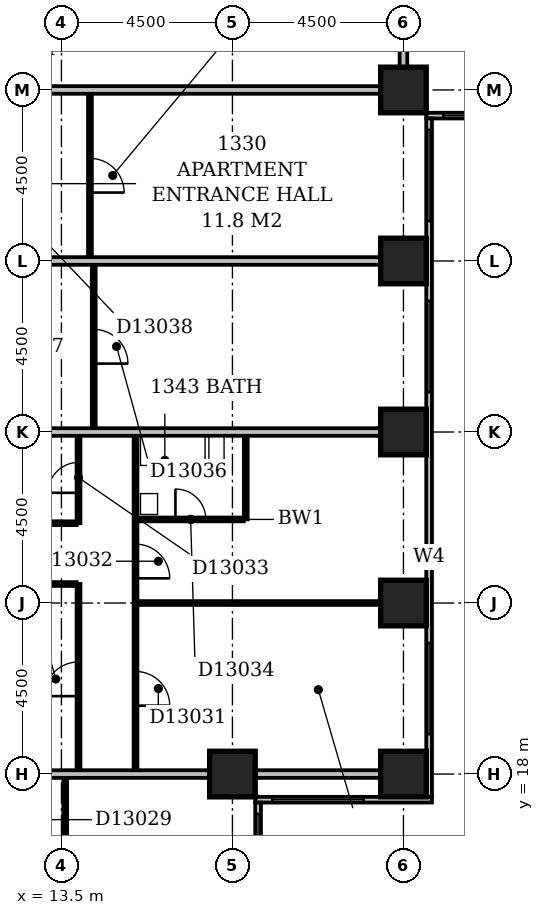
"""IFC4 building model, lengths in metres.
Left out: names, types, materials, properties, quantities, classifications, styles, units other than length and angle.
Written with IfcOpenShell. Run it as: python <this file> out.ifc"""

import sys

from ifc_helpers import new_model, si_unit, direction, frame, frame_2d, origin, origin_2d, place, context, subcontext, project, spatial, rectangle, extrude, element, fill, save


model = new_model("IFC4")
c1 = context("Model", 3, precision=1e-05, world=origin(), true_north=direction((0.0, 1.0)))
c2 = subcontext(c1, "Body", "Model", "MODEL_VIEW")
j1 = project(units=[si_unit("LENGTHUNIT", "METRE"), si_unit("PLANEANGLEUNIT", "RADIAN")], contexts=[c1])
p1 = place(None, origin())
s1 = spatial("IfcSite", under=j1, at=p1, CompositionType="ELEMENT")
p2 = place(p1, origin())
s2 = spatial("IfcBuilding", under=s1, at=p2, CompositionType="ELEMENT")
p3 = place(p2, frame((0.0, 0.0, 57.8)))
s3 = spatial("IfcBuildingStorey", under=s2, at=p3, CompositionType="ELEMENT", Elevation=57.8)
for number, where, z_axis, x_axis in (
    (1, (18.0, 18.0, -0.3), (0.0, 0.0, 1.0), (1.0, 0.0, 0.0)),
    (2, (22.5, 18.0, -0.3), (0.0, 0.0, 1.0), (1.0, 0.0, 0.0)),
    (3, (22.5, 22.5, -0.3), (0.0, 0.0, 1.0), (1.0, 0.0, 0.0)),
    (4, (22.5, 27.0, -0.3), (0.0, 0.0, 1.0), (1.0, 0.0, 0.0)),
    (5, (22.5, 31.5, -0.3), (0.0, 0.0, 1.0), (1.0, 0.0, 0.0)),
    (6, (22.5, 36.0, -0.3), (0.0, 0.0, 1.0), (1.0, 0.0, 0.0)),
):
    element("IfcColumn", number, at=place(p3, frame(where, z_axis=z_axis, x_axis=x_axis)), inside=s3, PredefinedType="COLUMN", context=c2, shape_type="SweptSolid", body=[
        extrude(rectangle(XDim=1.2, YDim=1.2, at=origin_2d()), origin(), (0.0, 0.0, 1.0), 3.6),
    ])
p4 = place(p3, frame((18.675, 8.4, 0.0), z_axis=(0.0, 0.0, 1.0), x_axis=(0.0, 1.0, 0.0)))
e7 = element("IfcWall", 7, at=p4, inside=s3, PredefinedType="STANDARD", context=c2, shape_type="SweptSolid", body=[
    extrude(rectangle(XDim=8.85, YDim=0.15, at=frame_2d((4.425, 0.0))), origin(), (0.0, 0.0, 1.0), 2.7),
])
p5 = place(p4, frame((1.447, 0.0, 0.6)))
e8 = element("IfcOpeningElement", 8, at=p5, cuts=e7, PredefinedType="OPENING", context=c2, shape_type="SweptSolid", body=[
    extrude(rectangle(XDim=1.8, YDim=1.8, at=frame_2d((0.9, 0.9))), frame((0.0, 0.087, 0.0), z_axis=(0.0, -1.0, 0.0), x_axis=(1.0, 0.0, 0.0)), (0.0, 0.0, 1.0), 0.174),
])
p6 = place(p4, frame((6.15, 0.0, 0.6)))
e9 = element("IfcOpeningElement", 9, at=p6, cuts=e7, PredefinedType="OPENING", context=c2, shape_type="SweptSolid", body=[
    extrude(rectangle(XDim=2.4, YDim=1.8, at=frame_2d((1.2, 0.9))), frame((0.0, 0.087, 0.0), z_axis=(0.0, -1.0, 0.0), x_axis=(1.0, 0.0, 0.0)), (0.0, 0.0, 1.0), 0.174),
])
p7 = place(p3, frame((18.6, 17.325, 0.0), z_axis=(0.0, 0.0, 1.0), x_axis=(1.0, 0.0, 0.0)))
e10 = element("IfcWall", 10, at=p7, inside=s3, PredefinedType="STANDARD", context=c2, shape_type="SweptSolid", body=[
    extrude(rectangle(XDim=4.65, YDim=0.15, at=frame_2d((2.325, 0.0))), origin(), (0.0, 0.0, 1.0), 2.7),
])
p8 = place(p7, frame((0.45, 0.0, 0.6)))
e11 = element("IfcOpeningElement", 11, at=p8, cuts=e10, PredefinedType="OPENING", context=c2, shape_type="SweptSolid", body=[
    extrude(rectangle(XDim=2.4, YDim=1.8, at=frame_2d((1.2, 0.9))), frame((0.0, 0.087, 0.0), z_axis=(0.0, -1.0, 0.0), x_axis=(1.0, 0.0, 0.0)), (0.0, 0.0, 1.0), 0.174),
])
p9 = place(p3, frame((23.175, 17.4, 0.0), z_axis=(0.0, 0.0, 1.0), x_axis=(0.0, 1.0, 0.0)))
e12 = element("IfcWall", 12, at=p9, inside=s3, PredefinedType="STANDARD", context=c2, shape_type="SweptSolid", body=[
    extrude(rectangle(XDim=17.85, YDim=0.15, at=frame_2d((8.925, 0.0))), origin(), (0.0, 0.0, 1.0), 2.7),
])
p10 = place(p9, frame((1.65, 0.0, 0.6)))
e13 = element("IfcOpeningElement", 13, at=p10, cuts=e12, PredefinedType="OPENING", context=c2, shape_type="SweptSolid", body=[
    extrude(rectangle(XDim=2.4, YDim=1.8, at=frame_2d((1.2, 0.9))), frame((0.0, 0.087, 0.0), z_axis=(0.0, -1.0, 0.0), x_axis=(1.0, 0.0, 0.0)), (0.0, 0.0, 1.0), 0.174),
])
p11 = place(p9, frame((6.006, 0.0, 0.6)))
e14 = element("IfcOpeningElement", 14, at=p11, cuts=e12, PredefinedType="OPENING", context=c2, shape_type="SweptSolid", body=[
    extrude(rectangle(XDim=0.6, YDim=1.8, at=frame_2d((0.3, 0.9))), frame((0.0, 0.087, 0.0), z_axis=(0.0, -1.0, 0.0), x_axis=(1.0, 0.0, 0.0)), (0.0, 0.0, 1.0), 0.174),
])
p12 = place(p9, frame((10.65, 0.0, 0.6)))
e15 = element("IfcOpeningElement", 15, at=p12, cuts=e12, PredefinedType="OPENING", context=c2, shape_type="SweptSolid", body=[
    extrude(rectangle(XDim=2.4, YDim=1.8, at=frame_2d((1.2, 0.9))), frame((0.0, 0.087, 0.0), z_axis=(0.0, -1.0, 0.0), x_axis=(1.0, 0.0, 0.0)), (0.0, 0.0, 1.0), 0.174),
])
p13 = place(p9, frame((15.15, 0.0, 0.6)))
e16 = element("IfcOpeningElement", 16, at=p13, cuts=e12, PredefinedType="OPENING", context=c2, shape_type="SweptSolid", body=[
    extrude(rectangle(XDim=2.4, YDim=1.8, at=frame_2d((1.2, 0.9))), frame((0.0, 0.087, 0.0), z_axis=(0.0, -1.0, 0.0), x_axis=(1.0, 0.0, 0.0)), (0.0, 0.0, 1.0), 0.174),
])
p14 = place(p3, frame((23.1, 35.325, 0.0), z_axis=(0.0, 0.0, 1.0), x_axis=(1.0, 0.0, 0.0)))
e17 = element("IfcWall", 17, at=p14, inside=s3, PredefinedType="STANDARD", context=c2, shape_type="SweptSolid", body=[
    extrude(rectangle(XDim=45.15, YDim=0.15, at=frame_2d((22.575, 0.0))), origin(), (0.0, 0.0, 1.0), 2.7),
])
p15 = place(p14, frame((0.45, 0.0, 0.6)))
e18 = element("IfcOpeningElement", 18, at=p15, cuts=e17, PredefinedType="OPENING", context=c2, shape_type="SweptSolid", body=[
    extrude(rectangle(XDim=2.4, YDim=1.8, at=frame_2d((1.2, 0.9))), frame((0.0, 0.087, 0.0), z_axis=(0.0, -1.0, 0.0), x_axis=(1.0, 0.0, 0.0)), (0.0, 0.0, 1.0), 0.174),
])
p16 = place(p14, frame((6.854, 0.0, 0.6)))
e19 = element("IfcOpeningElement", 19, at=p16, cuts=e17, PredefinedType="OPENING", context=c2, shape_type="SweptSolid", body=[
    extrude(rectangle(XDim=0.6, YDim=1.8, at=frame_2d((0.3, 0.9))), frame((0.0, 0.087, 0.0), z_axis=(0.0, -1.0, 0.0), x_axis=(1.0, 0.0, 0.0)), (0.0, 0.0, 1.0), 0.174),
])
p17 = place(p14, frame((9.45, 0.0, 0.6)))
e20 = element("IfcOpeningElement", 20, at=p17, cuts=e17, PredefinedType="OPENING", context=c2, shape_type="SweptSolid", body=[
    extrude(rectangle(XDim=2.4, YDim=1.8, at=frame_2d((1.2, 0.9))), frame((0.0, 0.087, 0.0), z_axis=(0.0, -1.0, 0.0), x_axis=(1.0, 0.0, 0.0)), (0.0, 0.0, 1.0), 0.174),
])
p18 = place(p14, frame((13.95, 0.0, 0.6)))
e21 = element("IfcOpeningElement", 21, at=p18, cuts=e17, PredefinedType="OPENING", context=c2, shape_type="SweptSolid", body=[
    extrude(rectangle(XDim=2.4, YDim=1.8, at=frame_2d((1.2, 0.9))), frame((0.0, 0.087, 0.0), z_axis=(0.0, -1.0, 0.0), x_axis=(1.0, 0.0, 0.0)), (0.0, 0.0, 1.0), 0.174),
])
p19 = place(p14, frame((18.323, 0.0, 0.6)))
e22 = element("IfcOpeningElement", 22, at=p19, cuts=e17, PredefinedType="OPENING", context=c2, shape_type="SweptSolid", body=[
    extrude(rectangle(XDim=1.2, YDim=1.8, at=frame_2d((0.6, 0.9))), frame((0.0, 0.087, 0.0), z_axis=(0.0, -1.0, 0.0), x_axis=(1.0, 0.0, 0.0)), (0.0, 0.0, 1.0), 0.174),
])
p20 = place(p14, frame((22.95, 0.0, 0.6)))
e23 = element("IfcOpeningElement", 23, at=p20, cuts=e17, PredefinedType="OPENING", context=c2, shape_type="SweptSolid", body=[
    extrude(rectangle(XDim=2.4, YDim=1.8, at=frame_2d((1.2, 0.9))), frame((0.0, 0.087, 0.0), z_axis=(0.0, -1.0, 0.0), x_axis=(1.0, 0.0, 0.0)), (0.0, 0.0, 1.0), 0.174),
])
p21 = place(p14, frame((27.45, 0.0, 0.6)))
e24 = element("IfcOpeningElement", 24, at=p21, cuts=e17, PredefinedType="OPENING", context=c2, shape_type="SweptSolid", body=[
    extrude(rectangle(XDim=2.4, YDim=1.8, at=frame_2d((1.2, 0.9))), frame((0.0, 0.087, 0.0), z_axis=(0.0, -1.0, 0.0), x_axis=(1.0, 0.0, 0.0)), (0.0, 0.0, 1.0), 0.174),
])
p22 = place(p14, frame((31.706, 0.0, 0.6)))
e25 = element("IfcOpeningElement", 25, at=p22, cuts=e17, PredefinedType="OPENING", context=c2, shape_type="SweptSolid", body=[
    extrude(rectangle(XDim=1.2, YDim=1.8, at=frame_2d((0.6, 0.9))), frame((0.0, 0.087, 0.0), z_axis=(0.0, -1.0, 0.0), x_axis=(1.0, 0.0, 0.0)), (0.0, 0.0, 1.0), 0.174),
])
p23 = place(p14, frame((36.45, 0.0, 0.6)))
e26 = element("IfcOpeningElement", 26, at=p23, cuts=e17, PredefinedType="OPENING", context=c2, shape_type="SweptSolid", body=[
    extrude(rectangle(XDim=2.4, YDim=1.8, at=frame_2d((1.2, 0.9))), frame((0.0, 0.087, 0.0), z_axis=(0.0, -1.0, 0.0), x_axis=(1.0, 0.0, 0.0)), (0.0, 0.0, 1.0), 0.174),
])
p24 = place(p14, frame((40.95, 0.0, 0.6)))
e27 = element("IfcOpeningElement", 27, at=p24, cuts=e17, PredefinedType="OPENING", context=c2, shape_type="SweptSolid", body=[
    extrude(rectangle(XDim=2.4, YDim=1.8, at=frame_2d((1.2, 0.9))), frame((0.0, 0.087, 0.0), z_axis=(0.0, -1.0, 0.0), x_axis=(1.0, 0.0, 0.0)), (0.0, 0.0, 1.0), 0.174),
])
p25 = place(p3, frame((13.6, 9.6, 0.0), z_axis=(0.0, 0.0, 1.0), x_axis=(0.0, 1.0, 0.0)))
e28 = element("IfcWall", 28, at=p25, inside=s3, PredefinedType="PARTITIONING", context=c2, shape_type="SweptSolid", body=[
    extrude(rectangle(XDim=8.3, YDim=0.1, at=frame_2d((4.15, 0.0))), origin(), (0.0, 0.0, 1.0), 3.3),
])
p26 = place(p25, frame((1.2, 0.0, 0.0)))
e29 = element("IfcOpeningElement", 29, at=p26, cuts=e28, PredefinedType="OPENING", context=c2, shape_type="SweptSolid", body=[
    extrude(rectangle(XDim=0.9, YDim=2.1, at=frame_2d((0.45, 1.05))), frame((0.0, 0.062, 0.0), z_axis=(0.0, -1.0, 0.0), x_axis=(1.0, 0.0, 0.0)), (0.0, 0.0, 1.0), 0.124),
])
p27 = place(p25, frame((5.7, 0.0, 0.0)))
e30 = element("IfcOpeningElement", 30, at=p27, cuts=e28, PredefinedType="OPENING", context=c2, shape_type="SweptSolid", body=[
    extrude(rectangle(XDim=0.9, YDim=2.1, at=frame_2d((0.45, 1.05))), frame((0.0, 0.062, 0.0), z_axis=(0.0, -1.0, 0.0), x_axis=(1.0, 0.0, 0.0)), (0.0, 0.0, 1.0), 0.124),
])
p28 = place(p3, frame((9.1, 18.0, 0.0), z_axis=(0.0, 0.0, 1.0), x_axis=(1.0, 0.0, 0.0)))
e31 = element("IfcWall", 31, at=p28, inside=s3, PredefinedType="PARTITIONING", context=c2, shape_type="SweptSolid", body=[
    extrude(rectangle(XDim=8.3, YDim=0.2, at=frame_2d((4.15, 0.0))), origin(), (0.0, 0.0, 1.0), 2.6),
])
p29 = place(p3, frame((18.6, 18.0, 0.0), z_axis=(0.0, 0.0, 1.0), x_axis=(1.0, 0.0, 0.0)))
e32 = element("IfcWall", 32, at=p29, inside=s3, PredefinedType="PARTITIONING", context=c2, shape_type="SweptSolid", body=[
    extrude(rectangle(XDim=3.3, YDim=0.2, at=frame_2d((1.65, 0.0))), origin(), (0.0, 0.0, 1.0), 2.7),
])
p30 = place(p3, frame((13.95, 18.1, 0.0), z_axis=(0.0, 0.0, 1.0), x_axis=(0.0, 1.0, 0.0)))
e33 = element("IfcWall", 33, at=p30, inside=s3, PredefinedType="PARTITIONING", context=c2, shape_type="SweptSolid", body=[
    extrude(rectangle(XDim=4.9, YDim=0.1, at=frame_2d((2.45, 0.0))), origin(), (0.0, 0.0, 1.0), 3.3),
])
p31 = place(p30, frame((1.95, 0.0, 0.0)))
e34 = element("IfcOpeningElement", 34, at=p31, cuts=e33, PredefinedType="OPENING", context=c2, shape_type="SweptSolid", body=[
    extrude(rectangle(XDim=0.9, YDim=2.1, at=frame_2d((0.45, 1.05))), frame((0.0, 0.062, 0.0), z_axis=(0.0, -1.0, 0.0), x_axis=(1.0, 0.0, 0.0)), (0.0, 0.0, 1.0), 0.124),
])
p32 = place(p3, frame((15.45, 18.1, 0.0), z_axis=(0.0, 0.0, 1.0), x_axis=(0.0, 1.0, 0.0)))
e35 = element("IfcWall", 35, at=p32, inside=s3, PredefinedType="PARTITIONING", context=c2, shape_type="SweptSolid", body=[
    extrude(rectangle(XDim=8.8, YDim=0.1, at=frame_2d((4.4, 0.0))), origin(), (0.0, 0.0, 1.0), 3.3),
])
p33 = place(p32, frame((1.7, 0.0, 0.0)))
e36 = element("IfcOpeningElement", 36, at=p33, cuts=e35, PredefinedType="OPENING", context=c2, shape_type="SweptSolid", body=[
    extrude(rectangle(XDim=0.9, YDim=2.1, at=frame_2d((0.45, 1.05))), frame((0.0, 0.062, 0.0), z_axis=(0.0, -1.0, 0.0), x_axis=(1.0, 0.0, 0.0)), (0.0, 0.0, 1.0), 0.124),
])
p34 = place(p32, frame((5.05, 0.0, 0.0)))
e37 = element("IfcOpeningElement", 37, at=p34, cuts=e35, PredefinedType="OPENING", context=c2, shape_type="SweptSolid", body=[
    extrude(rectangle(XDim=0.9, YDim=2.1, at=frame_2d((0.45, 1.05))), frame((0.0, 0.062, 0.0), z_axis=(0.0, -1.0, 0.0), x_axis=(1.0, 0.0, 0.0)), (0.0, 0.0, 1.0), 0.124),
])
p35 = place(p3, frame((15.5, 22.5, 0.0), z_axis=(0.0, 0.0, 1.0), x_axis=(1.0, 0.0, 0.0)))
e38 = element("IfcWall", 38, at=p35, inside=s3, PredefinedType="PARTITIONING", context=c2, shape_type="SweptSolid", body=[
    extrude(rectangle(XDim=6.4, YDim=0.1, at=frame_2d((3.2, 0.0))), origin(), (0.0, 0.0, 1.0), 3.3),
])
p36 = place(p3, frame((9.1, 23.0, 0.0), z_axis=(0.0, 0.0, 1.0), x_axis=(1.0, 0.0, 0.0)))
e39 = element("IfcWall", 39, at=p36, inside=s3, PredefinedType="PARTITIONING", context=c2, shape_type="SweptSolid", body=[
    extrude(rectangle(XDim=4.8, YDim=0.1, at=frame_2d((2.4, 0.0))), origin(), (0.0, 0.0, 1.0), 3.3),
])
p37 = place(p3, frame((9.1, 24.6, 0.0), z_axis=(0.0, 0.0, 1.0), x_axis=(1.0, 0.0, 0.0)))
e40 = element("IfcWall", 40, at=p37, inside=s3, PredefinedType="PLUMBINGWALL", context=c2, shape_type="SweptSolid", body=[
    extrude(rectangle(XDim=4.8, YDim=0.1, at=frame_2d((2.4, 0.0))), origin(), (0.0, 0.0, 1.0), 3.3),
])
p38 = place(p3, frame((13.95, 24.6, 0.0), z_axis=(0.0, 0.0, 1.0), x_axis=(0.0, 1.0, 0.0)))
e41 = element("IfcWall", 41, at=p38, inside=s3, PredefinedType="PARTITIONING", context=c2, shape_type="SweptSolid", body=[
    extrude(rectangle(XDim=2.3, YDim=0.1, at=frame_2d((1.15, 0.0))), origin(), (0.0, 0.0, 1.0), 3.3),
])
p39 = place(p38, frame((0.8, 0.0, 0.0)))
e42 = element("IfcOpeningElement", 42, at=p39, cuts=e41, PredefinedType="OPENING", context=c2, shape_type="SweptSolid", body=[
    extrude(rectangle(XDim=0.8, YDim=2.1, at=frame_2d((0.4, 1.05))), frame((0.0, 0.062, 0.0), z_axis=(0.0, -1.0, 0.0), x_axis=(1.0, 0.0, 0.0)), (0.0, 0.0, 1.0), 0.124),
])
p40 = place(p3, frame((15.5, 24.7, 0.0), z_axis=(0.0, 0.0, 1.0), x_axis=(1.0, 0.0, 0.0)))
e43 = element("IfcWall", 43, at=p40, inside=s3, PredefinedType="PLUMBINGWALL", context=c2, shape_type="SweptSolid", body=[
    extrude(rectangle(XDim=2.8, YDim=0.1, at=frame_2d((1.4, 0.0))), origin(), (0.0, 0.0, 1.0), 3.3),
])
p41 = place(p40, frame((1.0, 0.0, 0.0)))
e44 = element("IfcOpeningElement", 44, at=p41, cuts=e43, PredefinedType="OPENING", context=c2, shape_type="SweptSolid", body=[
    extrude(rectangle(XDim=0.8, YDim=2.1, at=frame_2d((0.4, 1.05))), frame((0.0, 0.062, 0.0), z_axis=(0.0, -1.0, 0.0), x_axis=(1.0, 0.0, 0.0)), (0.0, 0.0, 1.0), 0.124),
])
p42 = place(p3, frame((18.35, 24.7, 0.0), z_axis=(0.0, 0.0, 1.0), x_axis=(0.0, 1.0, 0.0)))
e45 = element("IfcWall", 45, at=p42, inside=s3, PredefinedType="PLUMBINGWALL", context=c2, shape_type="SweptSolid", body=[
    extrude(rectangle(XDim=2.2, YDim=0.1, at=frame_2d((1.1, 0.0))), origin(), (0.0, 0.0, 1.0), 3.3),
])
p43 = place(p3, frame((9.1, 27.0, 0.0), z_axis=(0.0, 0.0, 1.0), x_axis=(1.0, 0.0, 0.0)))
e46 = element("IfcWall", 46, at=p43, inside=s3, PredefinedType="PARTITIONING", context=c2, shape_type="SweptSolid", body=[
    extrude(rectangle(XDim=12.8, YDim=0.2, at=frame_2d((6.4, 0.0))), origin(), (0.0, 0.0, 1.0), 2.7),
])
p44 = place(p3, frame((14.35, 27.1, 0.0), z_axis=(0.0, 0.0, 1.0), x_axis=(0.0, 1.0, 0.0)))
e47 = element("IfcWall", 47, at=p44, inside=s3, PredefinedType="PARTITIONING", context=c2, shape_type="SweptSolid", body=[
    extrude(rectangle(XDim=4.3, YDim=0.1, at=frame_2d((2.15, 0.0))), origin(), (0.0, 0.0, 1.0), 3.3),
])
p45 = place(p44, frame((1.7, 0.0, 0.0)))
e48 = element("IfcOpeningElement", 48, at=p45, cuts=e47, PredefinedType="OPENING", context=c2, shape_type="SweptSolid", body=[
    extrude(rectangle(XDim=0.9, YDim=2.1, at=frame_2d((0.45, 1.05))), frame((0.0, 0.062, 0.0), z_axis=(0.0, -1.0, 0.0), x_axis=(1.0, 0.0, 0.0)), (0.0, 0.0, 1.0), 0.124),
])
p46 = place(p3, frame((9.1, 31.5, 0.0), z_axis=(0.0, 0.0, 1.0), x_axis=(1.0, 0.0, 0.0)))
e49 = element("IfcWall", 49, at=p46, inside=s3, PredefinedType="PARTITIONING", context=c2, shape_type="SweptSolid", body=[
    extrude(rectangle(XDim=12.8, YDim=0.2, at=frame_2d((6.4, 0.0))), origin(), (0.0, 0.0, 1.0), 3.3),
])
p47 = place(p3, frame((14.25, 31.6, 0.0), z_axis=(0.0, 0.0, 1.0), x_axis=(0.0, 1.0, 0.0)))
e50 = element("IfcWall", 50, at=p47, inside=s3, PredefinedType="PARTITIONING", context=c2, shape_type="SweptSolid", body=[
    extrude(rectangle(XDim=4.3, YDim=0.1, at=frame_2d((2.15, 0.0))), origin(), (0.0, 0.0, 1.0), 3.3),
])
p48 = place(p47, frame((1.7, 0.0, 0.0)))
e51 = element("IfcOpeningElement", 51, at=p48, cuts=e50, PredefinedType="OPENING", context=c2, shape_type="SweptSolid", body=[
    extrude(rectangle(XDim=0.9, YDim=2.1, at=frame_2d((0.45, 1.05))), frame((0.0, 0.062, 0.0), z_axis=(0.0, -1.0, 0.0), x_axis=(1.0, 0.0, 0.0)), (0.0, 0.0, 1.0), 0.124),
])
p49 = place(p3, frame((9.1, 36.0, 0.0), z_axis=(0.0, 0.0, 1.0), x_axis=(1.0, 0.0, 0.0)))
e52 = element("IfcWall", 52, at=p49, inside=s3, PredefinedType="PARTITIONING", context=c2, shape_type="SweptSolid", body=[
    extrude(rectangle(XDim=12.8, YDim=0.2, at=frame_2d((6.4, 0.0))), origin(), (0.0, 0.0, 1.0), 2.4),
])
p50 = place(p3, frame((22.5, 36.6, 0.0), z_axis=(0.0, 0.0, 1.0), x_axis=(0.0, 1.0, 0.0)))
e53 = element("IfcWall", 53, at=p50, inside=s3, PredefinedType="PARTITIONING", context=c2, shape_type="SweptSolid", body=[
    extrude(rectangle(XDim=12.8, YDim=0.2, at=frame_2d((6.4, 0.0))), origin(), (0.0, 0.0, 1.0), 3.3),
])
p51 = place(p6, origin())
e54 = element("IfcWindow", 54, at=p51, inside=s3, PartitioningType="SINGLE_PANEL", PredefinedType="WINDOW", context=c2, shape_type="SweptSolid", body=[
    extrude(rectangle(XDim=2.4, YDim=1.8, at=frame_2d((1.2, 0.9))), frame((0.0, 0.03, 0.0), z_axis=(0.0, -1.0, 0.0), x_axis=(1.0, 0.0, 0.0)), (0.0, 0.0, 1.0), 0.06),
])
fill(e9, e54)
p52 = place(p8, origin())
e55 = element("IfcWindow", 55, at=p52, inside=s3, PartitioningType="SINGLE_PANEL", PredefinedType="WINDOW", context=c2, shape_type="SweptSolid", body=[
    extrude(rectangle(XDim=2.4, YDim=1.8, at=frame_2d((1.2, 0.9))), frame((0.0, 0.03, 0.0), z_axis=(0.0, -1.0, 0.0), x_axis=(1.0, 0.0, 0.0)), (0.0, 0.0, 1.0), 0.06),
])
fill(e11, e55)
p53 = place(p10, origin())
e56 = element("IfcWindow", 56, at=p53, inside=s3, PartitioningType="SINGLE_PANEL", PredefinedType="WINDOW", context=c2, shape_type="SweptSolid", body=[
    extrude(rectangle(XDim=2.4, YDim=1.8, at=frame_2d((1.2, 0.9))), frame((0.0, 0.03, 0.0), z_axis=(0.0, -1.0, 0.0), x_axis=(1.0, 0.0, 0.0)), (0.0, 0.0, 1.0), 0.06),
])
fill(e13, e56)
p54 = place(p11, origin())
e57 = element("IfcWindow", 57, at=p54, inside=s3, PartitioningType="SINGLE_PANEL", PredefinedType="WINDOW", context=c2, shape_type="SweptSolid", body=[
    extrude(rectangle(XDim=0.6, YDim=1.8, at=frame_2d((0.3, 0.9))), frame((0.0, 0.03, 0.0), z_axis=(0.0, -1.0, 0.0), x_axis=(1.0, 0.0, 0.0)), (0.0, 0.0, 1.0), 0.06),
])
fill(e14, e57)
p55 = place(p12, origin())
e58 = element("IfcWindow", 58, at=p55, inside=s3, PartitioningType="SINGLE_PANEL", PredefinedType="WINDOW", context=c2, shape_type="SweptSolid", body=[
    extrude(rectangle(XDim=2.4, YDim=1.8, at=frame_2d((1.2, 0.9))), frame((0.0, 0.03, 0.0), z_axis=(0.0, -1.0, 0.0), x_axis=(1.0, 0.0, 0.0)), (0.0, 0.0, 1.0), 0.06),
])
fill(e15, e58)
p56 = place(p13, origin())
e59 = element("IfcWindow", 59, at=p56, inside=s3, PartitioningType="SINGLE_PANEL", PredefinedType="WINDOW", context=c2, shape_type="SweptSolid", body=[
    extrude(rectangle(XDim=2.4, YDim=1.8, at=frame_2d((1.2, 0.9))), frame((0.0, 0.03, 0.0), z_axis=(0.0, -1.0, 0.0), x_axis=(1.0, 0.0, 0.0)), (0.0, 0.0, 1.0), 0.06),
])
fill(e16, e59)
p57 = place(p15, origin())
e60 = element("IfcWindow", 60, at=p57, inside=s3, PartitioningType="SINGLE_PANEL", PredefinedType="WINDOW", context=c2, shape_type="SweptSolid", body=[
    extrude(rectangle(XDim=2.4, YDim=1.8, at=frame_2d((1.2, 0.9))), frame((0.0, 0.03, 0.0), z_axis=(0.0, -1.0, 0.0), x_axis=(1.0, 0.0, 0.0)), (0.0, 0.0, 1.0), 0.06),
])
fill(e18, e60)
p58 = place(p31, origin())
e61 = element("IfcDoor", 61, at=p58, inside=s3, OperationType="SINGLE_SWING_LEFT", PredefinedType="DOOR", context=c2, shape_type="SweptSolid", body=[
    extrude(rectangle(XDim=0.9, YDim=2.1, at=frame_2d((0.45, 1.05))), frame((0.0, 0.025, 0.0), z_axis=(0.0, -1.0, 0.0), x_axis=(1.0, 0.0, 0.0)), (0.0, 0.0, 1.0), 0.05),
])
fill(e34, e61)
p59 = place(p33, frame((0.9, 0.0, 0.0), z_axis=(0.0, 0.0, 1.0), x_axis=(-1.0, 0.0, 0.0)))
e62 = element("IfcDoor", 62, at=p59, inside=s3, OperationType="SINGLE_SWING_RIGHT", PredefinedType="DOOR", context=c2, shape_type="SweptSolid", body=[
    extrude(rectangle(XDim=0.9, YDim=2.1, at=frame_2d((0.45, 1.05))), frame((0.0, 0.025, 0.0), z_axis=(0.0, -1.0, 0.0), x_axis=(1.0, 0.0, 0.0)), (0.0, 0.0, 1.0), 0.05),
])
fill(e36, e62)
p60 = place(p34, frame((0.9, 0.0, 0.0), z_axis=(0.0, 0.0, 1.0), x_axis=(-1.0, 0.0, 0.0)))
e63 = element("IfcDoor", 63, at=p60, inside=s3, OperationType="SINGLE_SWING_RIGHT", PredefinedType="DOOR", context=c2, shape_type="SweptSolid", body=[
    extrude(rectangle(XDim=0.9, YDim=2.1, at=frame_2d((0.45, 1.05))), frame((0.0, 0.025, 0.0), z_axis=(0.0, -1.0, 0.0), x_axis=(1.0, 0.0, 0.0)), (0.0, 0.0, 1.0), 0.05),
])
fill(e37, e63)
p61 = place(p39, origin())
e64 = element("IfcDoor", 64, at=p61, inside=s3, OperationType="SINGLE_SWING_LEFT", PredefinedType="DOOR", context=c2, shape_type="SweptSolid", body=[
    extrude(rectangle(XDim=0.8, YDim=2.1, at=frame_2d((0.4, 1.05))), frame((0.0, 0.025, 0.0), z_axis=(0.0, -1.0, 0.0), x_axis=(1.0, 0.0, 0.0)), (0.0, 0.0, 1.0), 0.05),
])
fill(e42, e64)
p62 = place(p41, origin())
e65 = element("IfcDoor", 65, at=p62, inside=s3, OperationType="SINGLE_SWING_LEFT", PredefinedType="DOOR", context=c2, shape_type="SweptSolid", body=[
    extrude(rectangle(XDim=0.8, YDim=2.1, at=frame_2d((0.4, 1.05))), frame((0.0, 0.025, 0.0), z_axis=(0.0, -1.0, 0.0), x_axis=(1.0, 0.0, 0.0)), (0.0, 0.0, 1.0), 0.05),
])
fill(e44, e65)
p63 = place(p45, frame((0.9, 0.0, 0.0), z_axis=(0.0, 0.0, 1.0), x_axis=(-1.0, 0.0, 0.0)))
e66 = element("IfcDoor", 66, at=p63, inside=s3, OperationType="SINGLE_SWING_RIGHT", PredefinedType="DOOR", context=c2, shape_type="SweptSolid", body=[
    extrude(rectangle(XDim=0.9, YDim=2.1, at=frame_2d((0.45, 1.05))), frame((0.0, 0.025, 0.0), z_axis=(0.0, -1.0, 0.0), x_axis=(1.0, 0.0, 0.0)), (0.0, 0.0, 1.0), 0.05),
])
fill(e48, e66)
p64 = place(p48, frame((0.9, 0.0, 0.0), z_axis=(0.0, 0.0, 1.0), x_axis=(-1.0, 0.0, 0.0)))
e67 = element("IfcDoor", 67, at=p64, inside=s3, OperationType="SINGLE_SWING_RIGHT", PredefinedType="DOOR", context=c2, shape_type="SweptSolid", body=[
    extrude(rectangle(XDim=0.9, YDim=2.1, at=frame_2d((0.45, 1.05))), frame((0.0, 0.025, 0.0), z_axis=(0.0, -1.0, 0.0), x_axis=(1.0, 0.0, 0.0)), (0.0, 0.0, 1.0), 0.05),
])
fill(e51, e67)
save(model, sys.argv[1])
